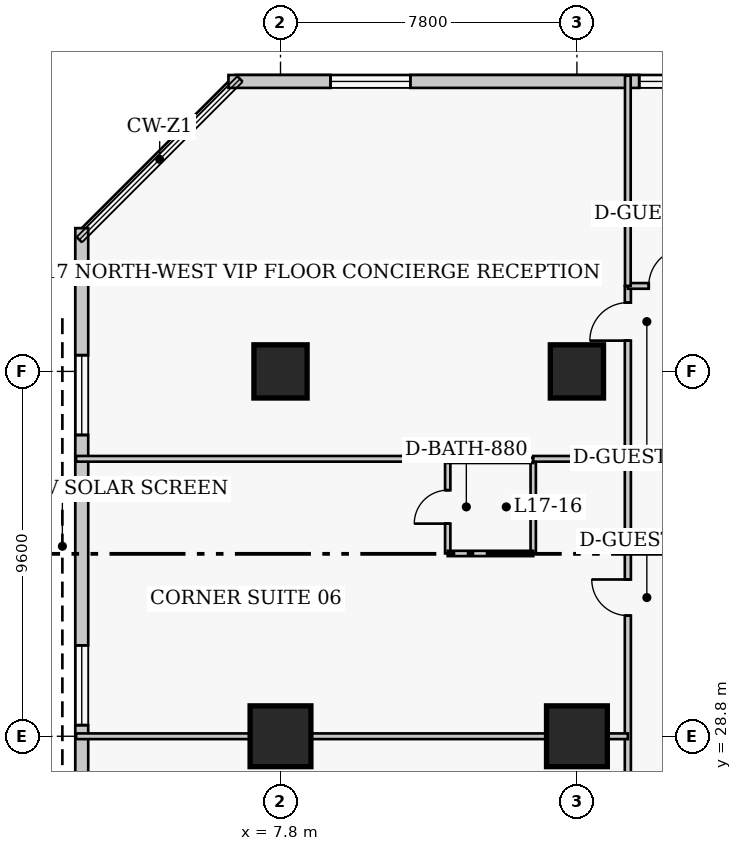
"""IFC4 building model, lengths in metres.
Left out: names, types, materials, properties, quantities, classifications, styles, units other than length and angle.
Written with IfcOpenShell. Run it as: python <this file> out.ifc"""

import sys

from ifc_helpers import new_model, si_unit, direction, frame, frame_2d, origin, origin_2d, place, context, subcontext, project, spatial, rectangle, extrude, element, fill, save


model = new_model("IFC4")
c1 = context("Model", 3, precision=1e-05, world=origin(), true_north=direction((0.0, 1.0)))
c2 = subcontext(c1, "Body", "Model", "MODEL_VIEW")
j1 = project(units=[si_unit("LENGTHUNIT", "METRE"), si_unit("PLANEANGLEUNIT", "RADIAN")], contexts=[c1])
p1 = place(None, origin())
s1 = spatial("IfcSite", under=j1, at=p1, CompositionType="ELEMENT")
p2 = place(p1, origin())
s2 = spatial("IfcBuilding", under=s1, at=p2, CompositionType="ELEMENT")
p3 = place(p2, frame((0.0, 0.0, 71.6)))
s3 = spatial("IfcBuildingStorey", under=s2, at=p3, CompositionType="ELEMENT", Elevation=71.6)
p4 = place(p3, frame((7.8, 28.8, 0.0), z_axis=(0.0, 0.0, 1.0), x_axis=(1.0, 0.0, 0.0)))
e1 = element("IfcColumn", 1, at=p4, inside=s3, PredefinedType="COLUMN", context=c2, shape_type="SweptSolid", body=[
    extrude(rectangle(XDim=1.6, YDim=1.6, at=origin_2d()), origin(), (0.0, 0.0, 1.0), 3.8),
])
p5 = place(p3, frame((7.8, 38.4, 0.0), z_axis=(0.0, 0.0, 1.0), x_axis=(1.0, 0.0, 0.0)))
e2 = element("IfcColumn", 2, at=p5, inside=s3, PredefinedType="COLUMN", context=c2, shape_type="SweptSolid", body=[
    extrude(rectangle(XDim=1.4, YDim=1.4, at=origin_2d()), origin(), (0.0, 0.0, 1.0), 3.8),
])
p6 = place(p3, frame((15.6, 28.8, 0.0), z_axis=(0.0, 0.0, 1.0), x_axis=(1.0, 0.0, 0.0)))
e3 = element("IfcColumn", 3, at=p6, inside=s3, PredefinedType="COLUMN", context=c2, shape_type="SweptSolid", body=[
    extrude(rectangle(XDim=1.6, YDim=1.6, at=origin_2d()), origin(), (0.0, 0.0, 1.0), 3.8),
])
p7 = place(p3, frame((15.6, 38.4, 0.0), z_axis=(0.0, 0.0, 1.0), x_axis=(1.0, 0.0, 0.0)))
e4 = element("IfcColumn", 4, at=p7, inside=s3, PredefinedType="COLUMN", context=c2, shape_type="SweptSolid", body=[
    extrude(rectangle(XDim=1.4, YDim=1.4, at=origin_2d()), origin(), (0.0, 0.0, 1.0), 3.8),
])
p8 = place(p3, frame((36.32, 46.03, 0.0), z_axis=(0.0, 0.0, 1.0), x_axis=(-1.0, 0.0, 0.0)))
e5 = element("IfcWall", 5, at=p8, inside=s3, PredefinedType="SOLIDWALL", context=c2, shape_type="SweptSolid", body=[
    extrude(rectangle(XDim=29.89, YDim=0.34, at=frame_2d((14.945, 0.0))), origin(), (0.0, 0.0, 1.0), 3.42),
])
p9 = place(p8, frame((2.686, 0.0, 0.85)))
e6 = element("IfcOpeningElement", 6, at=p9, cuts=e5, PredefinedType="OPENING", context=c2, shape_type="SweptSolid", body=[
    extrude(rectangle(XDim=2.1, YDim=1.85, at=frame_2d((1.05, 0.925))), frame((0.0, 0.18, 0.0), z_axis=(0.0, -1.0, 0.0), x_axis=(1.0, 0.0, 0.0)), (0.0, 0.0, 1.0), 0.36),
])
p10 = place(p8, frame((10.159, 0.0, 0.85)))
e7 = element("IfcOpeningElement", 7, at=p10, cuts=e5, PredefinedType="OPENING", context=c2, shape_type="SweptSolid", body=[
    extrude(rectangle(XDim=2.1, YDim=1.85, at=frame_2d((1.05, 0.925))), frame((0.0, 0.18, 0.0), z_axis=(0.0, -1.0, 0.0), x_axis=(1.0, 0.0, 0.0)), (0.0, 0.0, 1.0), 0.36),
])
p11 = place(p8, frame((16.981, 0.0, 0.85)))
e8 = element("IfcOpeningElement", 8, at=p11, cuts=e5, PredefinedType="OPENING", context=c2, shape_type="SweptSolid", body=[
    extrude(rectangle(XDim=2.1, YDim=1.85, at=frame_2d((1.05, 0.925))), frame((0.0, 0.18, 0.0), z_axis=(0.0, -1.0, 0.0), x_axis=(1.0, 0.0, 0.0)), (0.0, 0.0, 1.0), 0.36),
])
p12 = place(p8, frame((25.104, 0.0, 0.85)))
e9 = element("IfcOpeningElement", 9, at=p12, cuts=e5, PredefinedType="OPENING", context=c2, shape_type="SweptSolid", body=[
    extrude(rectangle(XDim=2.1, YDim=1.85, at=frame_2d((1.05, 0.925))), frame((0.0, 0.18, 0.0), z_axis=(0.0, -1.0, 0.0), x_axis=(1.0, 0.0, 0.0)), (0.0, 0.0, 1.0), 0.36),
])
p13 = place(p3, frame((2.57, 42.17, 0.0), z_axis=(0.0, 0.0, 1.0), x_axis=(0.0, -1.0, 0.0)))
e10 = element("IfcWall", 10, at=p13, inside=s3, PredefinedType="SOLIDWALL", context=c2, shape_type="SweptSolid", body=[
    extrude(rectangle(XDim=35.14, YDim=0.34, at=frame_2d((17.57, 0.0))), origin(), (0.0, 0.0, 1.0), 3.42),
])
p14 = place(p13, frame((3.343, 0.0, 0.85)))
e11 = element("IfcOpeningElement", 11, at=p14, cuts=e10, PredefinedType="OPENING", context=c2, shape_type="SweptSolid", body=[
    extrude(rectangle(XDim=2.1, YDim=1.85, at=frame_2d((1.05, 0.925))), frame((0.0, 0.18, 0.0), z_axis=(0.0, -1.0, 0.0), x_axis=(1.0, 0.0, 0.0)), (0.0, 0.0, 1.0), 0.36),
])
p15 = place(p13, frame((10.978, 0.0, 0.85)))
e12 = element("IfcOpeningElement", 12, at=p15, cuts=e10, PredefinedType="OPENING", context=c2, shape_type="SweptSolid", body=[
    extrude(rectangle(XDim=2.1, YDim=1.85, at=frame_2d((1.05, 0.925))), frame((0.0, 0.18, 0.0), z_axis=(0.0, -1.0, 0.0), x_axis=(1.0, 0.0, 0.0)), (0.0, 0.0, 1.0), 0.36),
])
p16 = place(p13, frame((19.762, 0.0, 0.85)))
e13 = element("IfcOpeningElement", 13, at=p16, cuts=e10, PredefinedType="OPENING", context=c2, shape_type="SweptSolid", body=[
    extrude(rectangle(XDim=2.1, YDim=1.85, at=frame_2d((1.05, 0.925))), frame((0.0, 0.18, 0.0), z_axis=(0.0, -1.0, 0.0), x_axis=(1.0, 0.0, 0.0)), (0.0, 0.0, 1.0), 0.36),
])
p17 = place(p13, frame((28.548, 0.0, 0.85)))
e14 = element("IfcOpeningElement", 14, at=p17, cuts=e10, PredefinedType="OPENING", context=c2, shape_type="SweptSolid", body=[
    extrude(rectangle(XDim=2.1, YDim=1.85, at=frame_2d((1.05, 0.925))), frame((0.0, 0.18, 0.0), z_axis=(0.0, -1.0, 0.0), x_axis=(1.0, 0.0, 0.0)), (0.0, 0.0, 1.0), 0.36),
])
p18 = place(p3, frame((16.94, 5.05, 0.0), z_axis=(0.0, 0.0, 1.0), x_axis=(0.0, 1.0, 0.0)))
e15 = element("IfcWall", 15, at=p18, inside=s3, PredefinedType="PARTITIONING", context=c2, shape_type="SweptSolid", body=[
    extrude(rectangle(XDim=35.6, YDim=0.16, at=frame_2d((17.8, 0.0))), origin(), (0.0, 0.0, 1.0), 3.42),
])
p19 = place(p18, frame((2.6, 0.0, 0.0)))
e16 = element("IfcOpeningElement", 16, at=p19, cuts=e15, PredefinedType="OPENING", context=c2, shape_type="SweptSolid", body=[
    extrude(rectangle(XDim=0.95, YDim=2.1, at=frame_2d((0.475, 1.05))), frame((0.0, 0.09, 0.0), z_axis=(0.0, -1.0, 0.0), x_axis=(1.0, 0.0, 0.0)), (0.0, 0.0, 1.0), 0.18),
])
p20 = place(p18, frame((10.075, 0.0, 0.0)))
e17 = element("IfcOpeningElement", 17, at=p20, cuts=e15, PredefinedType="OPENING", context=c2, shape_type="SweptSolid", body=[
    extrude(rectangle(XDim=0.95, YDim=2.1, at=frame_2d((0.475, 1.05))), frame((0.0, 0.09, 0.0), z_axis=(0.0, -1.0, 0.0), x_axis=(1.0, 0.0, 0.0)), (0.0, 0.0, 1.0), 0.18),
])
p21 = place(p18, frame((18.875, 0.0, 0.0)))
e18 = element("IfcOpeningElement", 18, at=p21, cuts=e15, PredefinedType="OPENING", context=c2, shape_type="SweptSolid", body=[
    extrude(rectangle(XDim=0.95, YDim=2.1, at=frame_2d((0.475, 1.05))), frame((0.0, 0.09, 0.0), z_axis=(0.0, -1.0, 0.0), x_axis=(1.0, 0.0, 0.0)), (0.0, 0.0, 1.0), 0.18),
])
p22 = place(p18, frame((26.925, 0.0, 0.0)))
e19 = element("IfcOpeningElement", 19, at=p22, cuts=e15, PredefinedType="OPENING", context=c2, shape_type="SweptSolid", body=[
    extrude(rectangle(XDim=0.95, YDim=2.1, at=frame_2d((0.475, 1.05))), frame((0.0, 0.09, 0.0), z_axis=(0.0, -1.0, 0.0), x_axis=(1.0, 0.0, 0.0)), (0.0, 0.0, 1.0), 0.18),
])
p23 = place(p18, frame((34.16, 0.0, 0.0)))
e20 = element("IfcOpeningElement", 20, at=p23, cuts=e15, PredefinedType="OPENING", context=c2, shape_type="SweptSolid", body=[
    extrude(rectangle(XDim=1.0, YDim=2.15, at=frame_2d((0.5, 1.075))), frame((0.0, 0.09, 0.0), z_axis=(0.0, -1.0, 0.0), x_axis=(1.0, 0.0, 0.0)), (0.0, 0.0, 1.0), 0.18),
])
p24 = place(p3, frame((16.94, 40.65, 0.0), z_axis=(0.0, 0.0, 1.0), x_axis=(1.0, 0.0, 0.0)))
e21 = element("IfcWall", 21, at=p24, inside=s3, PredefinedType="PARTITIONING", context=c2, shape_type="SweptSolid", body=[
    extrude(rectangle(XDim=5.16, YDim=0.15, at=frame_2d((2.58, 0.0))), origin(), (0.0, 0.0, 1.0), 3.42),
])
p25 = place(p24, frame((0.55, 0.0, 0.0)))
e22 = element("IfcOpeningElement", 22, at=p25, cuts=e21, PredefinedType="OPENING", context=c2, shape_type="SweptSolid", body=[
    extrude(rectangle(XDim=1.0, YDim=2.15, at=frame_2d((0.5, 1.075))), frame((0.0, 0.085, 0.0), z_axis=(0.0, -1.0, 0.0), x_axis=(1.0, 0.0, 0.0)), (0.0, 0.0, 1.0), 0.17),
])
p26 = place(p3, frame((16.94, 40.65, 0.0), z_axis=(0.0, 0.0, 1.0), x_axis=(0.0, 1.0, 0.0)))
e23 = element("IfcWall", 23, at=p26, inside=s3, PredefinedType="PARTITIONING", context=c2, shape_type="SweptSolid", body=[
    extrude(rectangle(XDim=5.53, YDim=0.15, at=frame_2d((2.765, 0.0))), origin(), (0.0, 0.0, 1.0), 3.42),
])
p27 = place(p3, frame((2.42, 28.8, 0.0), z_axis=(0.0, 0.0, 1.0), x_axis=(1.0, 0.0, 0.0)))
e24 = element("IfcWall", 24, at=p27, inside=s3, PredefinedType="PARTITIONING", context=c2, shape_type="SweptSolid", body=[
    extrude(rectangle(XDim=14.52, YDim=0.15, at=frame_2d((7.26, 0.0))), origin(), (0.0, 0.0, 1.0), 2.473),
])
p28 = place(p3, frame((12.2, 33.61, 0.0), z_axis=(0.0, 0.0, 1.0), x_axis=(0.0, 1.0, 0.0)))
e25 = element("IfcWall", 25, at=p28, inside=s3, PredefinedType="PLUMBINGWALL", context=c2, shape_type="SweptSolid", body=[
    extrude(rectangle(XDim=2.45, YDim=0.14, at=frame_2d((1.225, 0.0))), origin(), (0.0, 0.0, 1.0), 3.42),
])
p29 = place(p28, frame((0.785, 0.0, 0.0)))
e26 = element("IfcOpeningElement", 26, at=p29, cuts=e25, PredefinedType="OPENING", context=c2, shape_type="SweptSolid", body=[
    extrude(rectangle(XDim=0.88, YDim=2.05, at=frame_2d((0.44, 1.025))), frame((0.0, 0.08, 0.0), z_axis=(0.0, -1.0, 0.0), x_axis=(1.0, 0.0, 0.0)), (0.0, 0.0, 1.0), 0.16),
])
p30 = place(p3, frame((14.45, 33.61, 0.0), z_axis=(0.0, 0.0, 1.0), x_axis=(0.0, 1.0, 0.0)))
e27 = element("IfcWall", 27, at=p30, inside=s3, PredefinedType="PLUMBINGWALL", context=c2, shape_type="SweptSolid", body=[
    extrude(rectangle(XDim=2.45, YDim=0.14, at=frame_2d((1.225, 0.0))), origin(), (0.0, 0.0, 1.0), 3.42),
])
for number, where, z_axis, x_axis in (
    (28, (12.2, 33.61, 0.0), (0.0, 0.0, 1.0), (1.0, 0.0, 0.0)),
    (29, (12.2, 36.06, 0.0), (0.0, 0.0, 1.0), (1.0, 0.0, 0.0)),
):
    element("IfcWall", number, at=place(p3, frame(where, z_axis=z_axis, x_axis=x_axis)), inside=s3, PredefinedType="PLUMBINGWALL", context=c2, shape_type="SweptSolid", body=[
        extrude(rectangle(XDim=2.25, YDim=0.14, at=frame_2d((1.125, 0.0))), origin(), (0.0, 0.0, 1.0), 3.42),
    ])
p31 = place(p3, frame((2.42, 36.1, 0.0), z_axis=(0.0, 0.0, 1.0), x_axis=(1.0, 0.0, 0.0)))
e30 = element("IfcWall", 30, at=p31, inside=s3, PredefinedType="PARTITIONING", context=c2, shape_type="SweptSolid", body=[
    extrude(rectangle(XDim=9.78, YDim=0.15, at=frame_2d((4.89, 0.0))), origin(), (0.0, 0.0, 1.0), 3.42),
])
p32 = place(p3, frame((14.45, 36.1, 0.0), z_axis=(0.0, 0.0, 1.0), x_axis=(1.0, 0.0, 0.0)))
e31 = element("IfcWall", 31, at=p32, inside=s3, PredefinedType="PARTITIONING", context=c2, shape_type="SweptSolid", body=[
    extrude(rectangle(XDim=2.49, YDim=0.15, at=frame_2d((1.245, 0.0))), origin(), (0.0, 0.0, 1.0), 3.42),
])
p33 = place(p11, origin())
e32 = element("IfcWindow", 32, at=p33, inside=s3, PartitioningType="SINGLE_PANEL", PredefinedType="WINDOW", context=c2, shape_type="SweptSolid", body=[
    extrude(rectangle(XDim=2.1, YDim=1.85, at=frame_2d((1.05, 0.925))), frame((0.0, 0.03, 0.0), z_axis=(0.0, -1.0, 0.0), x_axis=(1.0, 0.0, 0.0)), (0.0, 0.0, 1.0), 0.06),
])
fill(e8, e32)
p34 = place(p12, origin())
e33 = element("IfcWindow", 33, at=p34, inside=s3, PartitioningType="SINGLE_PANEL", PredefinedType="WINDOW", context=c2, shape_type="SweptSolid", body=[
    extrude(rectangle(XDim=2.1, YDim=1.85, at=frame_2d((1.05, 0.925))), frame((0.0, 0.03, 0.0), z_axis=(0.0, -1.0, 0.0), x_axis=(1.0, 0.0, 0.0)), (0.0, 0.0, 1.0), 0.06),
])
fill(e9, e33)
p35 = place(p14, origin())
e34 = element("IfcWindow", 34, at=p35, inside=s3, PartitioningType="SINGLE_PANEL", PredefinedType="WINDOW", context=c2, shape_type="SweptSolid", body=[
    extrude(rectangle(XDim=2.1, YDim=1.85, at=frame_2d((1.05, 0.925))), frame((0.0, 0.03, 0.0), z_axis=(0.0, -1.0, 0.0), x_axis=(1.0, 0.0, 0.0)), (0.0, 0.0, 1.0), 0.06),
])
fill(e11, e34)
p36 = place(p15, origin())
e35 = element("IfcWindow", 35, at=p36, inside=s3, PartitioningType="SINGLE_PANEL", PredefinedType="WINDOW", context=c2, shape_type="SweptSolid", body=[
    extrude(rectangle(XDim=2.1, YDim=1.85, at=frame_2d((1.05, 0.925))), frame((0.0, 0.03, 0.0), z_axis=(0.0, -1.0, 0.0), x_axis=(1.0, 0.0, 0.0)), (0.0, 0.0, 1.0), 0.06),
])
fill(e12, e35)
p37 = place(p25, origin())
e36 = element("IfcDoor", 36, at=p37, inside=s3, OperationType="SINGLE_SWING_RIGHT", PredefinedType="DOOR", context=c2, shape_type="SweptSolid", body=[
    extrude(rectangle(XDim=1.0, YDim=2.15, at=frame_2d((0.5, 1.075))), frame((0.0, 0.025, 0.0), z_axis=(0.0, -1.0, 0.0), x_axis=(1.0, 0.0, 0.0)), (0.0, 0.0, 1.0), 0.05),
])
fill(e22, e36)
p38 = place(p29, origin())
e37 = element("IfcDoor", 37, at=p38, inside=s3, OperationType="SINGLE_SWING_LEFT", PredefinedType="DOOR", context=c2, shape_type="SweptSolid", body=[
    extrude(rectangle(XDim=0.88, YDim=2.05, at=frame_2d((0.44, 1.025))), frame((0.0, 0.025, 0.0), z_axis=(0.0, -1.0, 0.0), x_axis=(1.0, 0.0, 0.0)), (0.0, 0.0, 1.0), 0.05),
])
fill(e26, e37)
p39 = place(p22, origin())
e38 = element("IfcDoor", 38, at=p39, inside=s3, OperationType="SINGLE_SWING_RIGHT", PredefinedType="DOOR", context=c2, shape_type="SweptSolid", body=[
    extrude(rectangle(XDim=0.95, YDim=2.1, at=frame_2d((0.475, 1.05))), frame((0.0, 0.025, 0.0), z_axis=(0.0, -1.0, 0.0), x_axis=(1.0, 0.0, 0.0)), (0.0, 0.0, 1.0), 0.05),
])
fill(e19, e38)
p40 = place(p23, origin())
e39 = element("IfcDoor", 39, at=p40, inside=s3, OperationType="SINGLE_SWING_LEFT", PredefinedType="DOOR", context=c2, shape_type="SweptSolid", body=[
    extrude(rectangle(XDim=1.0, YDim=2.15, at=frame_2d((0.5, 1.075))), frame((0.0, 0.025, 0.0), z_axis=(0.0, -1.0, 0.0), x_axis=(1.0, 0.0, 0.0)), (0.0, 0.0, 1.0), 0.05),
])
fill(e20, e39)
save(model, sys.argv[1])
